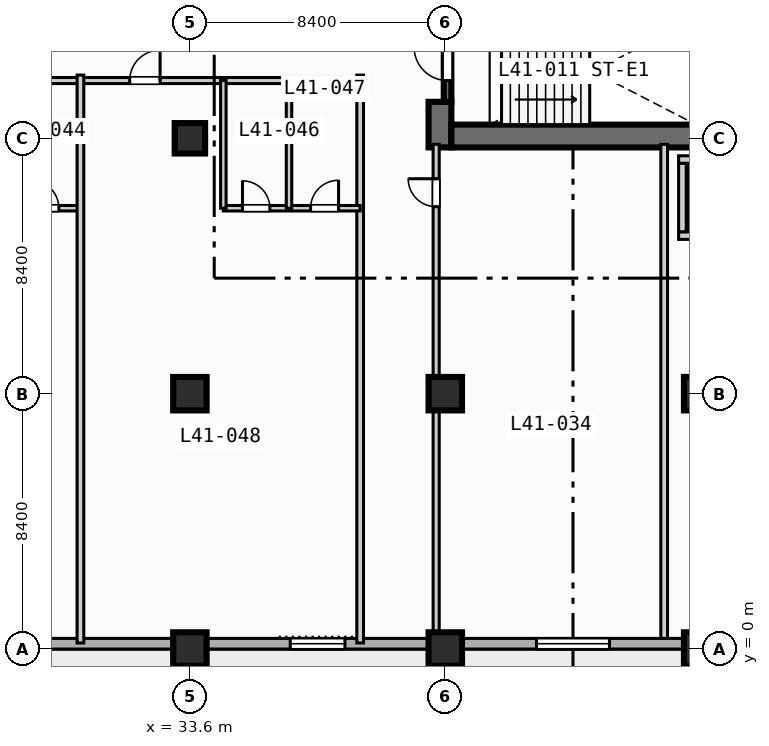
"""IFC4 building model, lengths in metres.
Left out: names, types, materials, properties, quantities, classifications, styles, units other than length and angle.
Written with IfcOpenShell. Run it as: python <this file> out.ifc"""

import sys

from ifc_helpers import new_model, si_unit, direction, frame, frame_2d, origin, origin_2d, place, context, subcontext, project, spatial, rectangle, extrude, element, fill, save


model = new_model("IFC4")
c1 = context("Model", 3, precision=1e-05, world=origin(), true_north=direction((0.0, 1.0)))
c2 = subcontext(c1, "Body", "Model", "MODEL_VIEW")
j1 = project(units=[si_unit("LENGTHUNIT", "METRE"), si_unit("PLANEANGLEUNIT", "RADIAN")], contexts=[c1])
p1 = place(None, origin())
s1 = spatial("IfcSite", under=j1, at=p1, CompositionType="ELEMENT")
p2 = place(p1, origin())
s2 = spatial("IfcBuilding", under=s1, at=p2, CompositionType="ELEMENT")
p3 = place(p2, frame((0.0, 0.0, 171.7)))
s3 = spatial("IfcBuildingStorey", under=s2, at=p3, CompositionType="ELEMENT", Elevation=171.7)
p4 = place(p3, frame((41.825, 16.5, 0.0), z_axis=(0.0, 0.0, 1.0), x_axis=(0.0, 1.0, 0.0)))
e1 = element("IfcWall", 1, at=p4, inside=s3, PredefinedType="SHEAR", context=c2, shape_type="SweptSolid", body=[
    extrude(rectangle(XDim=1.5, YDim=0.75, at=frame_2d((0.75, 0.0))), origin(), (0.0, 0.0, 1.0), 3.47),
])
p5 = place(p3, frame((42.2, 16.875, 0.0), z_axis=(0.0, 0.0, 1.0), x_axis=(1.0, 0.0, 0.0)))
e2 = element("IfcWall", 2, at=p5, inside=s3, PredefinedType="SHEAR", context=c2, shape_type="SweptSolid", body=[
    extrude(rectangle(XDim=16.35, YDim=0.75, at=frame_2d((8.175, 0.0))), origin(), (0.0, 0.0, 1.0), 3.47),
])
for number, where, z_axis, x_axis in (
    (3, (33.6, 0.0, 0.0), (0.0, 0.0, 1.0), (1.0, 0.0, 0.0)),
    (4, (33.6, 8.4, 0.0), (0.0, 0.0, 1.0), (1.0, 0.0, 0.0)),
):
    element("IfcColumn", number, at=place(p3, frame(where, z_axis=z_axis, x_axis=x_axis)), inside=s3, PredefinedType="COLUMN", context=c2, shape_type="SweptSolid", body=[
        extrude(rectangle(XDim=1.1, YDim=1.1, at=origin_2d()), origin(), (0.0, 0.0, 1.0), 3.7),
    ])
p6 = place(p3, frame((33.6, 16.8, 0.0), z_axis=(0.0, 0.0, 1.0), x_axis=(1.0, 0.0, 0.0)))
e5 = element("IfcColumn", 5, at=p6, inside=s3, PredefinedType="COLUMN", context=c2, shape_type="SweptSolid", body=[
    extrude(rectangle(XDim=1.0, YDim=1.0, at=origin_2d()), origin(), (0.0, 0.0, 1.0), 3.7),
])
for number, where, z_axis, x_axis in (
    (6, (42.0, 0.0, 0.0), (0.0, 0.0, 1.0), (1.0, 0.0, 0.0)),
    (7, (42.0, 8.4, 0.0), (0.0, 0.0, 1.0), (1.0, 0.0, 0.0)),
    (8, (50.4, 0.0, 0.0), (0.0, 0.0, 1.0), (1.0, 0.0, 0.0)),
    (9, (50.4, 8.4, 0.0), (0.0, 0.0, 1.0), (1.0, 0.0, 0.0)),
):
    element("IfcColumn", number, at=place(p3, frame(where, z_axis=z_axis, x_axis=x_axis)), inside=s3, PredefinedType="COLUMN", context=c2, shape_type="SweptSolid", body=[
        extrude(rectangle(XDim=1.1, YDim=1.1, at=origin_2d()), origin(), (0.0, 0.0, 1.0), 3.7),
    ])
p7 = place(p3, frame((72.425, 0.175, 0.0), z_axis=(0.0, 0.0, 1.0), x_axis=(-1.0, 0.0, 0.0)))
e10 = element("IfcWall", 10, at=p7, inside=s3, PredefinedType="STANDARD", context=c2, shape_type="SweptSolid", body=[
    extrude(rectangle(XDim=69.25, YDim=0.35, at=frame_2d((34.625, 0.0))), origin(), (0.0, 0.0, 1.0), 3.47),
])
p8 = place(p7, frame((51.725, 0.0, 0.0)))
e11 = element("IfcOpeningElement", 11, at=p8, cuts=e10, PredefinedType="OPENING", context=c2, shape_type="SweptSolid", body=[
    extrude(rectangle(XDim=1.4, YDim=2.2, at=frame_2d((0.7, 1.1))), frame((0.0, 0.185, 0.0), z_axis=(0.0, -1.0, 0.0), x_axis=(1.0, 0.0, 0.0)), (0.0, 0.0, 1.0), 0.37),
])
p9 = place(p7, frame((33.725, 0.0, 0.85)))
e12 = element("IfcOpeningElement", 12, at=p9, cuts=e10, PredefinedType="OPENING", context=c2, shape_type="SweptSolid", body=[
    extrude(rectangle(XDim=1.8, YDim=1.8, at=frame_2d((0.9, 0.9))), frame((0.0, 0.185, 0.0), z_axis=(0.0, -1.0, 0.0), x_axis=(1.0, 0.0, 0.0)), (0.0, 0.0, 1.0), 0.37),
])
p10 = place(p7, frame((25.025, 0.0, 0.85)))
e13 = element("IfcOpeningElement", 13, at=p10, cuts=e10, PredefinedType="OPENING", context=c2, shape_type="SweptSolid", body=[
    extrude(rectangle(XDim=2.4, YDim=1.95, at=frame_2d((1.2, 0.975))), frame((0.0, 0.185, 0.0), z_axis=(0.0, -1.0, 0.0), x_axis=(1.0, 0.0, 0.0)), (0.0, 0.0, 1.0), 0.37),
])
p11 = place(p7, frame((8.225, 0.0, 0.85)))
e14 = element("IfcOpeningElement", 14, at=p11, cuts=e10, PredefinedType="OPENING", context=c2, shape_type="SweptSolid", body=[
    extrude(rectangle(XDim=2.4, YDim=1.95, at=frame_2d((1.2, 0.975))), frame((0.0, 0.185, 0.0), z_axis=(0.0, -1.0, 0.0), x_axis=(1.0, 0.0, 0.0)), (0.0, 0.0, 1.0), 0.37),
])
p12 = place(p7, frame((64.725, 0.0, 0.85)))
e15 = element("IfcOpeningElement", 15, at=p12, cuts=e10, PredefinedType="OPENING", context=c2, shape_type="SweptSolid", body=[
    extrude(rectangle(XDim=1.8, YDim=1.8, at=frame_2d((0.9, 0.9))), frame((0.0, 0.185, 0.0), z_axis=(0.0, -1.0, 0.0), x_axis=(1.0, 0.0, 0.0)), (0.0, 0.0, 1.0), 0.37),
])
p13 = place(p7, frame((44.675, 0.0, 0.85)))
e16 = element("IfcOpeningElement", 16, at=p13, cuts=e10, PredefinedType="OPENING", context=c2, shape_type="SweptSolid", body=[
    extrude(rectangle(XDim=1.8, YDim=1.8, at=frame_2d((0.9, 0.9))), frame((0.0, 0.185, 0.0), z_axis=(0.0, -1.0, 0.0), x_axis=(1.0, 0.0, 0.0)), (0.0, 0.0, 1.0), 0.37),
])
p14 = place(p3, frame((42.075, 18.0, 0.0), z_axis=(0.0, 0.0, 1.0), x_axis=(0.0, 1.0, 0.0)))
e17 = element("IfcWall", 17, at=p14, inside=s3, PredefinedType="SOLIDWALL", context=c2, shape_type="SweptSolid", body=[
    extrude(rectangle(XDim=2.5, YDim=0.25, at=frame_2d((1.25, 0.0))), origin(), (0.0, 0.0, 1.0), 3.47),
])
p15 = place(p14, frame((0.7, 0.0, 0.0)))
e18 = element("IfcOpeningElement", 18, at=p15, cuts=e17, PredefinedType="OPENING", context=c2, shape_type="SweptSolid", body=[
    extrude(rectangle(XDim=1.1, YDim=2.15, at=frame_2d((0.55, 1.075))), frame((0.0, 0.135, 0.0), z_axis=(0.0, -1.0, 0.0), x_axis=(1.0, 0.0, 0.0)), (0.0, 0.0, 1.0), 0.27),
])
p16 = place(p3, frame((49.675, 13.6, 0.0), z_axis=(0.0, 0.0, 1.0), x_axis=(1.0, 0.0, 0.0)))
e19 = element("IfcWall", 19, at=p16, inside=s3, PredefinedType="SOLIDWALL", context=c2, shape_type="SweptSolid", body=[
    extrude(rectangle(XDim=2.25, YDim=0.25, at=frame_2d((1.125, 0.0))), origin(), (0.0, 0.0, 1.0), 3.47),
])
p17 = place(p16, frame((0.4, 0.0, 0.0)))
e20 = element("IfcOpeningElement", 20, at=p17, cuts=e19, PredefinedType="OPENING", context=c2, shape_type="SweptSolid", body=[
    extrude(rectangle(XDim=1.1, YDim=2.15, at=frame_2d((0.55, 1.075))), frame((0.0, 0.135, 0.0), z_axis=(0.0, -1.0, 0.0), x_axis=(1.0, 0.0, 0.0)), (0.0, 0.0, 1.0), 0.27),
])
for number, where, z_axis, x_axis in (
    (21, (49.675, 16.1, 0.0), (0.0, 0.0, 1.0), (1.0, 0.0, 0.0)),
    (22, (49.8, 13.725, 0.0), (0.0, 0.0, 1.0), (0.0, 1.0, 0.0)),
):
    element("IfcWall", number, at=place(p3, frame(where, z_axis=z_axis, x_axis=x_axis)), inside=s3, PredefinedType="SOLIDWALL", context=c2, shape_type="SweptSolid", body=[
        extrude(rectangle(XDim=2.25, YDim=0.25, at=frame_2d((1.125, 0.0))), origin(), (0.0, 0.0, 1.0), 3.47),
    ])
p18 = place(p3, frame((41.7, 0.35, 0.0), z_axis=(0.0, 0.0, 1.0), x_axis=(0.0, 1.0, 0.0)))
e23 = element("IfcWall", 23, at=p18, inside=s3, PredefinedType="PARTITIONING", context=c2, shape_type="SweptSolid", body=[
    extrude(rectangle(XDim=16.25, YDim=0.2, at=frame_2d((8.125, 0.0))), origin(), (0.0, 0.0, 1.0), 2.82),
])
p19 = place(p18, frame((14.2, 0.0, 0.0)))
e24 = element("IfcOpeningElement", 24, at=p19, cuts=e23, PredefinedType="OPENING", context=c2, shape_type="SweptSolid", body=[
    extrude(rectangle(XDim=0.92, YDim=2.1, at=frame_2d((0.46, 1.05))), frame((0.0, 0.11, 0.0), z_axis=(0.0, -1.0, 0.0), x_axis=(1.0, 0.0, 0.0)), (0.0, 0.0, 1.0), 0.22),
])
p20 = place(p3, frame((49.2, 0.35, 0.0), z_axis=(0.0, 0.0, 1.0), x_axis=(0.0, 1.0, 0.0)))
e25 = element("IfcWall", 25, at=p20, inside=s3, PredefinedType="PARTITIONING", context=c2, shape_type="SweptSolid", body=[
    extrude(rectangle(XDim=16.25, YDim=0.22, at=frame_2d((8.125, 0.0))), origin(), (0.0, 0.0, 1.0), 3.47),
])
p21 = place(p3, frame((3.4, 18.7, 0.0), z_axis=(0.0, 0.0, 1.0), x_axis=(1.0, 0.0, 0.0)))
e26 = element("IfcWall", 26, at=p21, inside=s3, PredefinedType="PARTITIONING", context=c2, shape_type="SweptSolid", body=[
    extrude(rectangle(XDim=35.8, YDim=0.2, at=frame_2d((17.9, 0.0))), origin(), (0.0, 0.0, 1.0), 3.47),
])
p22 = place(p21, frame((1.67, 0.0, 0.0)))
e27 = element("IfcOpeningElement", 27, at=p22, cuts=e26, PredefinedType="OPENING", context=c2, shape_type="SweptSolid", body=[
    extrude(rectangle(XDim=1.0, YDim=2.15, at=frame_2d((0.5, 1.075))), frame((0.0, 0.11, 0.0), z_axis=(0.0, -1.0, 0.0), x_axis=(1.0, 0.0, 0.0)), (0.0, 0.0, 1.0), 0.22),
])
p23 = place(p21, frame((10.57, 0.0, 0.0)))
e28 = element("IfcOpeningElement", 28, at=p23, cuts=e26, PredefinedType="OPENING", context=c2, shape_type="SweptSolid", body=[
    extrude(rectangle(XDim=1.0, YDim=2.15, at=frame_2d((0.5, 1.075))), frame((0.0, 0.11, 0.0), z_axis=(0.0, -1.0, 0.0), x_axis=(1.0, 0.0, 0.0)), (0.0, 0.0, 1.0), 0.22),
])
p24 = place(p21, frame((19.47, 0.0, 0.0)))
e29 = element("IfcOpeningElement", 29, at=p24, cuts=e26, PredefinedType="OPENING", context=c2, shape_type="SweptSolid", body=[
    extrude(rectangle(XDim=1.0, YDim=2.15, at=frame_2d((0.5, 1.075))), frame((0.0, 0.11, 0.0), z_axis=(0.0, -1.0, 0.0), x_axis=(1.0, 0.0, 0.0)), (0.0, 0.0, 1.0), 0.22),
])
p25 = place(p21, frame((28.22, 0.0, 0.0)))
e30 = element("IfcOpeningElement", 30, at=p25, cuts=e26, PredefinedType="OPENING", context=c2, shape_type="SweptSolid", body=[
    extrude(rectangle(XDim=1.0, YDim=2.15, at=frame_2d((0.5, 1.075))), frame((0.0, 0.11, 0.0), z_axis=(0.0, -1.0, 0.0), x_axis=(1.0, 0.0, 0.0)), (0.0, 0.0, 1.0), 0.22),
])
p26 = place(p3, frame((25.5, 14.5, 0.0), z_axis=(0.0, 0.0, 1.0), x_axis=(1.0, 0.0, 0.0)))
e31 = element("IfcWall", 31, at=p26, inside=s3, PredefinedType="PLUMBINGWALL", context=c2, shape_type="SweptSolid", body=[
    extrude(rectangle(XDim=4.5, YDim=0.18, at=frame_2d((2.25, 0.0))), origin(), (0.0, 0.0, 1.0), 3.47),
])
p27 = place(p26, frame((0.63, 0.0, 0.0)))
e32 = element("IfcOpeningElement", 32, at=p27, cuts=e31, PredefinedType="OPENING", context=c2, shape_type="SweptSolid", body=[
    extrude(rectangle(XDim=0.9, YDim=2.1, at=frame_2d((0.45, 1.05))), frame((0.0, 0.1, 0.0), z_axis=(0.0, -1.0, 0.0), x_axis=(1.0, 0.0, 0.0)), (0.0, 0.0, 1.0), 0.2),
])
p28 = place(p26, frame((2.87, 0.0, 0.0)))
e33 = element("IfcOpeningElement", 33, at=p28, cuts=e31, PredefinedType="OPENING", context=c2, shape_type="SweptSolid", body=[
    extrude(rectangle(XDim=0.92, YDim=2.1, at=frame_2d((0.46, 1.05))), frame((0.0, 0.1, 0.0), z_axis=(0.0, -1.0, 0.0), x_axis=(1.0, 0.0, 0.0)), (0.0, 0.0, 1.0), 0.2),
])
for number, where, z_axis, x_axis in (
    (34, (30.0, 0.2, 0.0), (0.0, 0.0, 1.0), (0.0, 1.0, 0.0)),
    (35, (39.2, 0.2, 0.0), (0.0, 0.0, 1.0), (0.0, 1.0, 0.0)),
):
    element("IfcWall", number, at=place(p3, frame(where, z_axis=z_axis, x_axis=x_axis)), inside=s3, PredefinedType="PARTITIONING", context=c2, shape_type="SweptSolid", body=[
        extrude(rectangle(XDim=18.68, YDim=0.22, at=frame_2d((9.34, 0.0))), origin(), (0.0, 0.0, 1.0), 3.47),
    ])
p29 = place(p3, frame((34.7, 14.5, 0.0), z_axis=(0.0, 0.0, 1.0), x_axis=(1.0, 0.0, 0.0)))
e36 = element("IfcWall", 36, at=p29, inside=s3, PredefinedType="PLUMBINGWALL", context=c2, shape_type="SweptSolid", body=[
    extrude(rectangle(XDim=4.5, YDim=0.18, at=frame_2d((2.25, 0.0))), origin(), (0.0, 0.0, 1.0), 3.47),
])
p30 = place(p29, frame((0.63, 0.0, 0.0)))
e37 = element("IfcOpeningElement", 37, at=p30, cuts=e36, PredefinedType="OPENING", context=c2, shape_type="SweptSolid", body=[
    extrude(rectangle(XDim=0.9, YDim=2.1, at=frame_2d((0.45, 1.05))), frame((0.0, 0.1, 0.0), z_axis=(0.0, -1.0, 0.0), x_axis=(1.0, 0.0, 0.0)), (0.0, 0.0, 1.0), 0.2),
])
p31 = place(p29, frame((2.87, 0.0, 0.0)))
e38 = element("IfcOpeningElement", 38, at=p31, cuts=e36, PredefinedType="OPENING", context=c2, shape_type="SweptSolid", body=[
    extrude(rectangle(XDim=0.92, YDim=2.1, at=frame_2d((0.46, 1.05))), frame((0.0, 0.1, 0.0), z_axis=(0.0, -1.0, 0.0), x_axis=(1.0, 0.0, 0.0)), (0.0, 0.0, 1.0), 0.2),
])
for number, where, z_axis, x_axis in (
    (39, (34.7, 14.5, 0.0), (0.0, 0.0, 1.0), (0.0, 1.0, 0.0)),
    (40, (36.86, 14.5, 0.0), (0.0, 0.0, 1.0), (0.0, 1.0, 0.0)),
):
    element("IfcWall", number, at=place(p3, frame(where, z_axis=z_axis, x_axis=x_axis)), inside=s3, PredefinedType="PLUMBINGWALL", context=c2, shape_type="SweptSolid", body=[
        extrude(rectangle(XDim=4.2, YDim=0.18, at=frame_2d((2.1, 0.0))), origin(), (0.0, 0.0, 1.0), 3.47),
    ])
p32 = place(p9, origin())
e41 = element("IfcWindow", 41, at=p32, inside=s3, PartitioningType="SINGLE_PANEL", PredefinedType="WINDOW", context=c2, shape_type="SweptSolid", body=[
    extrude(rectangle(XDim=1.8, YDim=1.8, at=frame_2d((0.9, 0.9))), frame((0.0, 0.03, 0.0), z_axis=(0.0, -1.0, 0.0), x_axis=(1.0, 0.0, 0.0)), (0.0, 0.0, 1.0), 0.06),
])
fill(e12, e41)
p33 = place(p10, origin())
e42 = element("IfcWindow", 42, at=p33, inside=s3, PartitioningType="SINGLE_PANEL", PredefinedType="WINDOW", context=c2, shape_type="SweptSolid", body=[
    extrude(rectangle(XDim=2.4, YDim=1.95, at=frame_2d((1.2, 0.975))), frame((0.0, 0.03, 0.0), z_axis=(0.0, -1.0, 0.0), x_axis=(1.0, 0.0, 0.0)), (0.0, 0.0, 1.0), 0.06),
])
fill(e13, e42)
p34 = place(p15, origin())
e43 = element("IfcDoor", 43, at=p34, inside=s3, OperationType="SINGLE_SWING_RIGHT", PredefinedType="DOOR", context=c2, shape_type="SweptSolid", body=[
    extrude(rectangle(XDim=1.1, YDim=2.15, at=frame_2d((0.55, 1.075))), frame((0.0, 0.025, 0.0), z_axis=(0.0, -1.0, 0.0), x_axis=(1.0, 0.0, 0.0)), (0.0, 0.0, 1.0), 0.05),
])
fill(e18, e43)
p35 = place(p19, origin())
e44 = element("IfcDoor", 44, at=p35, inside=s3, OperationType="SINGLE_SWING_RIGHT", PredefinedType="DOOR", context=c2, shape_type="SweptSolid", body=[
    extrude(rectangle(XDim=0.92, YDim=2.1, at=frame_2d((0.46, 1.05))), frame((0.0, 0.025, 0.0), z_axis=(0.0, -1.0, 0.0), x_axis=(1.0, 0.0, 0.0)), (0.0, 0.0, 1.0), 0.05),
])
fill(e24, e44)
p36 = place(p25, origin())
e45 = element("IfcDoor", 45, at=p36, inside=s3, OperationType="SINGLE_SWING_RIGHT", PredefinedType="DOOR", context=c2, shape_type="SweptSolid", body=[
    extrude(rectangle(XDim=1.0, YDim=2.15, at=frame_2d((0.5, 1.075))), frame((0.0, 0.025, 0.0), z_axis=(0.0, -1.0, 0.0), x_axis=(1.0, 0.0, 0.0)), (0.0, 0.0, 1.0), 0.05),
])
fill(e30, e45)
p37 = place(p28, origin())
e46 = element("IfcDoor", 46, at=p37, inside=s3, OperationType="SINGLE_SWING_LEFT", PredefinedType="DOOR", context=c2, shape_type="SweptSolid", body=[
    extrude(rectangle(XDim=0.92, YDim=2.1, at=frame_2d((0.46, 1.05))), frame((0.0, 0.025, 0.0), z_axis=(0.0, -1.0, 0.0), x_axis=(1.0, 0.0, 0.0)), (0.0, 0.0, 1.0), 0.05),
])
fill(e33, e46)
p38 = place(p30, origin())
e47 = element("IfcDoor", 47, at=p38, inside=s3, OperationType="SINGLE_SWING_LEFT", PredefinedType="DOOR", context=c2, shape_type="SweptSolid", body=[
    extrude(rectangle(XDim=0.9, YDim=2.1, at=frame_2d((0.45, 1.05))), frame((0.0, 0.025, 0.0), z_axis=(0.0, -1.0, 0.0), x_axis=(1.0, 0.0, 0.0)), (0.0, 0.0, 1.0), 0.05),
])
fill(e37, e47)
p39 = place(p31, origin())
e48 = element("IfcDoor", 48, at=p39, inside=s3, OperationType="SINGLE_SWING_RIGHT", PredefinedType="DOOR", context=c2, shape_type="SweptSolid", body=[
    extrude(rectangle(XDim=0.92, YDim=2.1, at=frame_2d((0.46, 1.05))), frame((0.0, 0.025, 0.0), z_axis=(0.0, -1.0, 0.0), x_axis=(1.0, 0.0, 0.0)), (0.0, 0.0, 1.0), 0.05),
])
fill(e38, e48)
save(model, sys.argv[1])
